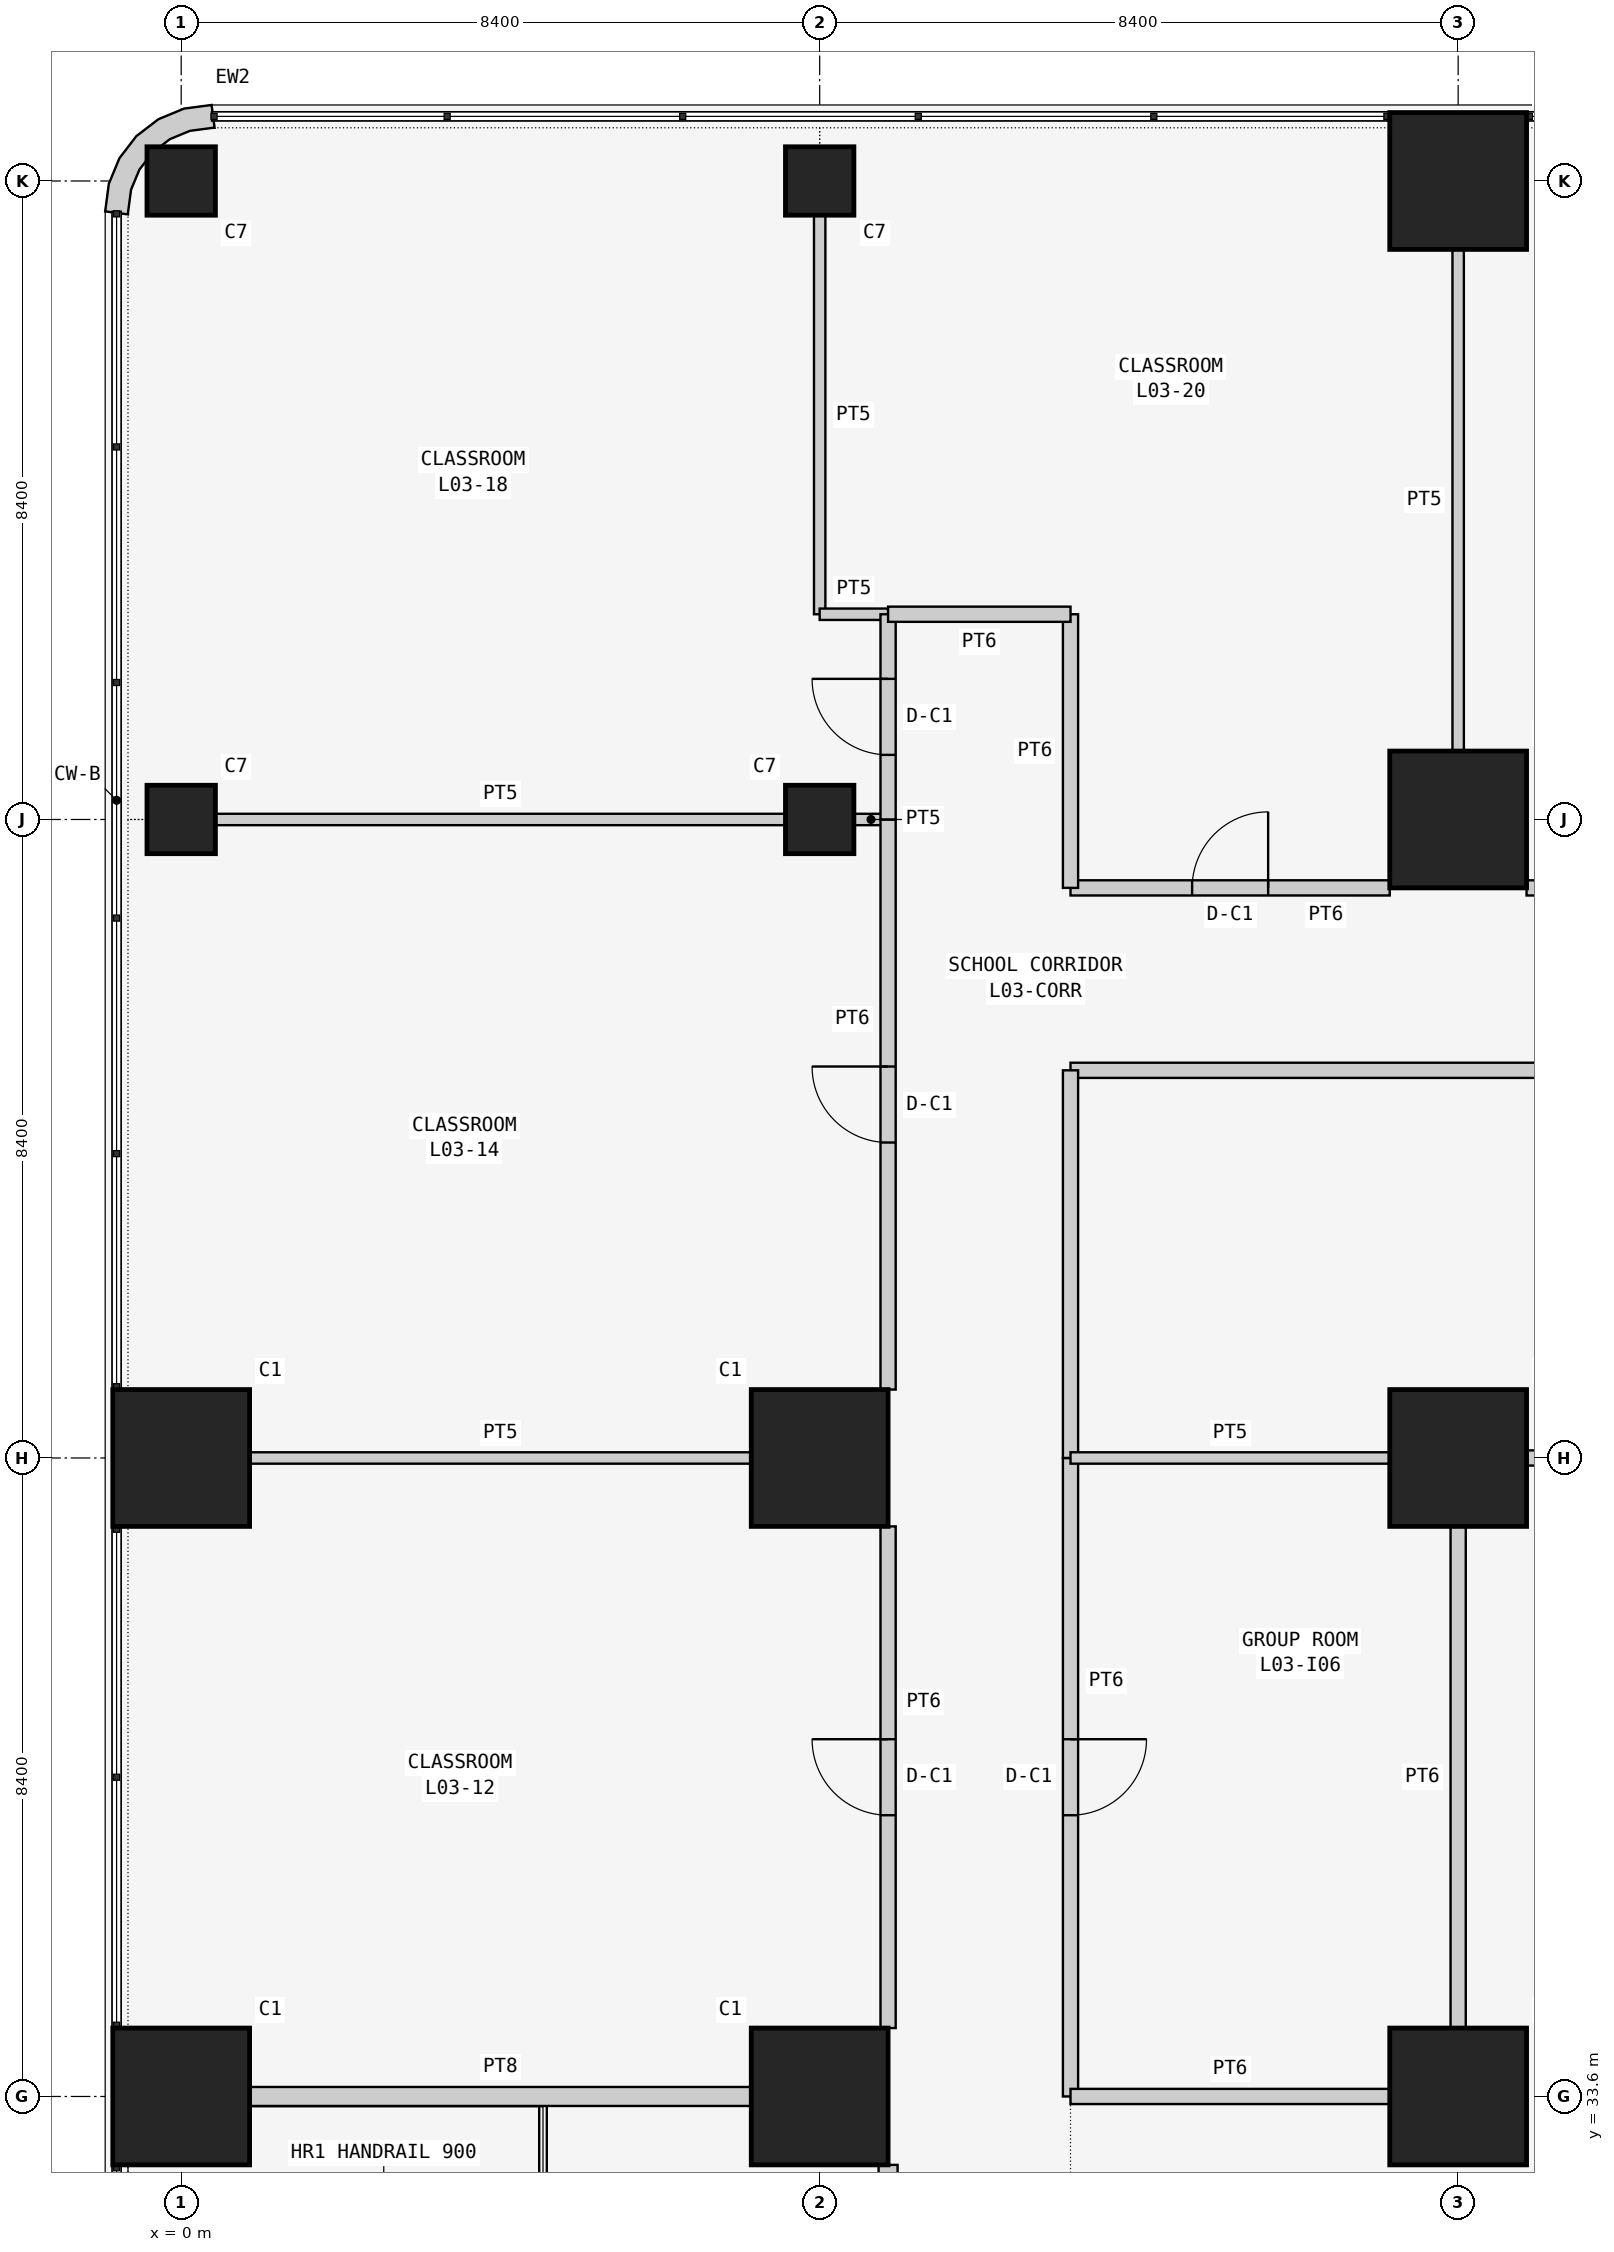
"""IFC4 building model, lengths in metres.
Left out: names, types, materials, properties, quantities, classifications, styles, units other than length and angle.
Written with IfcOpenShell. Run it as: python <this file> out.ifc"""

import sys

from ifc_helpers import new_model, si_unit, direction, frame, frame_2d, origin, origin_2d, place, context, subcontext, project, spatial, polyline, rectangle, outline, extrude, element, fill, save


model = new_model("IFC4")
c1 = context("Model", 3, precision=1e-05, world=origin(), true_north=direction((0.0, 1.0)))
c2 = subcontext(c1, "Body", "Model", "MODEL_VIEW")
j1 = project(units=[si_unit("LENGTHUNIT", "METRE"), si_unit("PLANEANGLEUNIT", "RADIAN")], contexts=[c1])
p1 = place(None, origin())
s1 = spatial("IfcSite", under=j1, at=p1, CompositionType="ELEMENT")
p2 = place(p1, origin())
s2 = spatial("IfcBuilding", under=s1, at=p2, CompositionType="ELEMENT")
p3 = place(p2, frame((0.0, 0.0, 15.0)))
s3 = spatial("IfcBuildingStorey", under=s2, at=p3, CompositionType="ELEMENT", Elevation=15.0)
for number, where, z_axis, x_axis in (
    (1, (0.0, 33.6, 0.0), (0.0, 0.0, 1.0), (1.0, 0.0, 0.0)),
    (2, (0.0, 42.0, 0.0), (0.0, 0.0, 1.0), (1.0, 0.0, 0.0)),
):
    element("IfcColumn", number, at=place(p3, frame(where, z_axis=z_axis, x_axis=x_axis)), inside=s3, PredefinedType="COLUMN", context=c2, shape_type="SweptSolid", body=[
        extrude(rectangle(XDim=1.8, YDim=1.8, at=origin_2d()), origin(), (0.0, 0.0, 1.0), 4.5),
    ])
for number, where, z_axis, x_axis in (
    (3, (0.0, 50.4, 0.0), (0.0, 0.0, 1.0), (1.0, 0.0, 0.0)),
    (4, (0.0, 58.8, 0.0), (0.0, 0.0, 1.0), (1.0, 0.0, 0.0)),
):
    element("IfcColumn", number, at=place(p3, frame(where, z_axis=z_axis, x_axis=x_axis)), inside=s3, PredefinedType="COLUMN", context=c2, shape_type="SweptSolid", body=[
        extrude(rectangle(XDim=0.9, YDim=0.9, at=origin_2d()), origin(), (0.0, 0.0, 1.0), 4.5),
    ])
for number, where, z_axis, x_axis in (
    (5, (8.4, 33.6, 0.0), (0.0, 0.0, 1.0), (1.0, 0.0, 0.0)),
    (6, (8.4, 42.0, 0.0), (0.0, 0.0, 1.0), (1.0, 0.0, 0.0)),
):
    element("IfcColumn", number, at=place(p3, frame(where, z_axis=z_axis, x_axis=x_axis)), inside=s3, PredefinedType="COLUMN", context=c2, shape_type="SweptSolid", body=[
        extrude(rectangle(XDim=1.8, YDim=1.8, at=origin_2d()), origin(), (0.0, 0.0, 1.0), 4.5),
    ])
for number, where, z_axis, x_axis in (
    (7, (8.4, 50.4, 0.0), (0.0, 0.0, 1.0), (1.0, 0.0, 0.0)),
    (8, (8.4, 58.8, 0.0), (0.0, 0.0, 1.0), (1.0, 0.0, 0.0)),
):
    element("IfcColumn", number, at=place(p3, frame(where, z_axis=z_axis, x_axis=x_axis)), inside=s3, PredefinedType="COLUMN", context=c2, shape_type="SweptSolid", body=[
        extrude(rectangle(XDim=0.9, YDim=0.9, at=origin_2d()), origin(), (0.0, 0.0, 1.0), 4.5),
    ])
for number, where, z_axis, x_axis in (
    (9, (16.8, 33.6, 0.0), (0.0, 0.0, 1.0), (1.0, 0.0, 0.0)),
    (10, (16.8, 42.0, 0.0), (0.0, 0.0, 1.0), (1.0, 0.0, 0.0)),
    (11, (16.8, 50.4, 0.0), (0.0, 0.0, 1.0), (1.0, 0.0, 0.0)),
    (12, (16.8, 58.8, 0.0), (0.0, 0.0, 1.0), (1.0, 0.0, 0.0)),
):
    element("IfcColumn", number, at=place(p3, frame(where, z_axis=z_axis, x_axis=x_axis)), inside=s3, PredefinedType="COLUMN", context=c2, shape_type="SweptSolid", body=[
        extrude(rectangle(XDim=1.8, YDim=1.8, at=origin_2d()), origin(), (0.0, 0.0, 1.0), 4.5),
    ])
p4 = place(p3, frame((0.445, 59.648, 0.0), z_axis=(0.0, 0.0, 1.0), x_axis=(-0.707106781187, 0.707106781187, 0.0)))
e13 = element("IfcWall", 13, at=p4, inside=s3, PredefinedType="SOLIDWALL", context=c2, shape_type="SweptSolid", body=[
    extrude(outline(polyline([(0.139, 1.904), (-0.101, 1.72), (-0.087, 1.706), (0.1, 1.463), (0.209, 1.198), (0.247, 0.914), (0.209, 0.63), (0.1, 0.365), (-0.087, 0.122), (-0.101, 0.108), (0.139, -0.076), (0.362, 0.214), (0.502, 0.552), (0.549, 0.914), (0.502, 1.276), (0.362, 1.614), (0.139, 1.904)])), origin(), (0.0, 0.0, 1.0), 4.3),
])
p5 = place(p3, frame((0.9, 33.6, 0.0), z_axis=(0.0, 0.0, 1.0), x_axis=(1.0, 0.0, 0.0)))
e14 = element("IfcWall", 14, at=p5, inside=s3, PredefinedType="SOLIDWALL", context=c2, shape_type="SweptSolid", body=[
    extrude(rectangle(XDim=6.6, YDim=0.25, at=frame_2d((3.3, 0.0))), origin(), (0.0, 0.0, 1.0), 3.543),
])
p6 = place(p3, frame((9.3, 32.7, 0.0), z_axis=(0.0, 0.0, 1.0), x_axis=(0.0, -1.0, 0.0)))
e15 = element("IfcWall", 15, at=p6, inside=s3, PredefinedType="SOLIDWALL", context=c2, shape_type="SweptSolid", body=[
    extrude(rectangle(XDim=6.6, YDim=0.25, at=frame_2d((3.3, 0.0))), origin(), (0.0, 0.0, 1.0), 4.3),
])
p7 = place(p6, frame((2.0, 0.0, 0.0)))
e16 = element("IfcOpeningElement", 16, at=p7, cuts=e15, PredefinedType="OPENING", context=c2, shape_type="SweptSolid", body=[
    extrude(rectangle(XDim=2.6, YDim=2.4, at=frame_2d((1.3, 1.2))), frame((0.0, 0.135, 0.0), z_axis=(0.0, -1.0, 0.0), x_axis=(1.0, 0.0, 0.0)), (0.0, 0.0, 1.0), 0.27),
])
p8 = place(p3, frame((0.9, 42.0, 0.0), z_axis=(0.0, 0.0, 1.0), x_axis=(1.0, 0.0, 0.0)))
e17 = element("IfcWall", 17, at=p8, inside=s3, PredefinedType="PARTITIONING", context=c2, shape_type="SweptSolid", body=[
    extrude(rectangle(XDim=6.6, YDim=0.15, at=frame_2d((3.3, 0.0))), origin(), (0.0, 0.0, 1.0), 3.543),
])
p9 = place(p3, frame((9.3, 41.1, 0.0), z_axis=(0.0, 0.0, 1.0), x_axis=(0.0, -1.0, 0.0)))
e18 = element("IfcWall", 18, at=p9, inside=s3, PredefinedType="PARTITIONING", context=c2, shape_type="SweptSolid", body=[
    extrude(rectangle(XDim=6.6, YDim=0.2, at=frame_2d((3.3, 0.0))), origin(), (0.0, 0.0, 1.0), 4.3),
])
p10 = place(p9, frame((2.8, 0.0, 0.0)))
e19 = element("IfcOpeningElement", 19, at=p10, cuts=e18, PredefinedType="OPENING", context=c2, shape_type="SweptSolid", body=[
    extrude(rectangle(XDim=1.0, YDim=2.1, at=frame_2d((0.5, 1.05))), frame((0.0, 0.11, 0.0), z_axis=(0.0, -1.0, 0.0), x_axis=(1.0, 0.0, 0.0)), (0.0, 0.0, 1.0), 0.22),
])
p11 = place(p3, frame((0.45, 50.4, 0.0), z_axis=(0.0, 0.0, 1.0), x_axis=(1.0, 0.0, 0.0)))
e20 = element("IfcWall", 20, at=p11, inside=s3, PredefinedType="PARTITIONING", context=c2, shape_type="SweptSolid", body=[
    extrude(rectangle(XDim=7.5, YDim=0.15, at=frame_2d((3.75, 0.0))), origin(), (0.0, 0.0, 1.0), 3.543),
])
p12 = place(p3, frame((8.85, 50.4, 0.0), z_axis=(0.0, 0.0, 1.0), x_axis=(1.0, 0.0, 0.0)))
e21 = element("IfcWall", 21, at=p12, inside=s3, PredefinedType="PARTITIONING", context=c2, shape_type="SweptSolid", body=[
    extrude(rectangle(XDim=0.45, YDim=0.15, at=frame_2d((0.225, 0.0))), origin(), (0.0, 0.0, 1.0), 3.543),
])
p13 = place(p3, frame((9.3, 50.4, 0.0), z_axis=(0.0, 0.0, 1.0), x_axis=(0.0, -1.0, 0.0)))
e22 = element("IfcWall", 22, at=p13, inside=s3, PredefinedType="PARTITIONING", context=c2, shape_type="SweptSolid", body=[
    extrude(rectangle(XDim=7.5, YDim=0.2, at=frame_2d((3.75, 0.0))), origin(), (0.0, 0.0, 1.0), 4.3),
])
p14 = place(p13, frame((3.25, 0.0, 0.0)))
e23 = element("IfcOpeningElement", 23, at=p14, cuts=e22, PredefinedType="OPENING", context=c2, shape_type="SweptSolid", body=[
    extrude(rectangle(XDim=1.0, YDim=2.1, at=frame_2d((0.5, 1.05))), frame((0.0, 0.11, 0.0), z_axis=(0.0, -1.0, 0.0), x_axis=(1.0, 0.0, 0.0)), (0.0, 0.0, 1.0), 0.22),
])
p15 = place(p3, frame((16.8, 51.3, 0.0), z_axis=(0.0, 0.0, 1.0), x_axis=(0.0, 1.0, 0.0)))
e24 = element("IfcWall", 24, at=p15, inside=s3, PredefinedType="PARTITIONING", context=c2, shape_type="SweptSolid", body=[
    extrude(rectangle(XDim=6.6, YDim=0.15, at=frame_2d((3.3, 0.0))), origin(), (0.0, 0.0, 1.0), 3.543),
])
p16 = place(p3, frame((24.3, 49.5, 0.0), z_axis=(0.0, 0.0, 1.0), x_axis=(-1.0, 0.0, 0.0)))
e25 = element("IfcWall", 25, at=p16, inside=s3, PredefinedType="PARTITIONING", context=c2, shape_type="SweptSolid", body=[
    extrude(rectangle(XDim=6.6, YDim=0.2, at=frame_2d((3.3, 0.0))), origin(), (0.0, 0.0, 1.0), 4.3),
])
p17 = place(p16, frame((2.8, 0.0, 0.0)))
e26 = element("IfcOpeningElement", 26, at=p17, cuts=e25, PredefinedType="OPENING", context=c2, shape_type="SweptSolid", body=[
    extrude(rectangle(XDim=1.0, YDim=2.1, at=frame_2d((0.5, 1.05))), frame((0.0, 0.11, 0.0), z_axis=(0.0, -1.0, 0.0), x_axis=(1.0, 0.0, 0.0)), (0.0, 0.0, 1.0), 0.22),
])
p18 = place(p3, frame((8.4, 58.35, 0.0), z_axis=(0.0, 0.0, 1.0), x_axis=(0.0, -1.0, 0.0)))
e27 = element("IfcWall", 27, at=p18, inside=s3, PredefinedType="PARTITIONING", context=c2, shape_type="SweptSolid", body=[
    extrude(rectangle(XDim=5.25, YDim=0.15, at=frame_2d((2.625, 0.0))), origin(), (0.0, 0.0, 1.0), 3.543),
])
p19 = place(p3, frame((8.4, 53.1, 0.0), z_axis=(0.0, 0.0, 1.0), x_axis=(1.0, 0.0, 0.0)))
e28 = element("IfcWall", 28, at=p19, inside=s3, PredefinedType="PARTITIONING", context=c2, shape_type="SweptSolid", body=[
    extrude(rectangle(XDim=0.9, YDim=0.15, at=frame_2d((0.45, 0.0))), origin(), (0.0, 0.0, 1.0), 4.3),
])
p20 = place(p3, frame((9.3, 53.1, 0.0), z_axis=(0.0, 0.0, 1.0), x_axis=(0.0, -1.0, 0.0)))
e29 = element("IfcWall", 29, at=p20, inside=s3, PredefinedType="PARTITIONING", context=c2, shape_type="SweptSolid", body=[
    extrude(rectangle(XDim=2.7, YDim=0.2, at=frame_2d((1.35, 0.0))), origin(), (0.0, 0.0, 1.0), 4.3),
])
p21 = place(p20, frame((0.85, 0.0, 0.0)))
e30 = element("IfcOpeningElement", 30, at=p21, cuts=e29, PredefinedType="OPENING", context=c2, shape_type="SweptSolid", body=[
    extrude(rectangle(XDim=1.0, YDim=2.1, at=frame_2d((0.5, 1.05))), frame((0.0, 0.11, 0.0), z_axis=(0.0, -1.0, 0.0), x_axis=(1.0, 0.0, 0.0)), (0.0, 0.0, 1.0), 0.22),
])
p22 = place(p3, frame((15.9, 49.5, 0.0), z_axis=(0.0, 0.0, 1.0), x_axis=(-1.0, 0.0, 0.0)))
e31 = element("IfcWall", 31, at=p22, inside=s3, PredefinedType="PARTITIONING", context=c2, shape_type="SweptSolid", body=[
    extrude(rectangle(XDim=4.2, YDim=0.2, at=frame_2d((2.1, 0.0))), origin(), (0.0, 0.0, 1.0), 4.3),
])
p23 = place(p22, frame((1.6, 0.0, 0.0)))
e32 = element("IfcOpeningElement", 32, at=p23, cuts=e31, PredefinedType="OPENING", context=c2, shape_type="SweptSolid", body=[
    extrude(rectangle(XDim=1.0, YDim=2.1, at=frame_2d((0.5, 1.05))), frame((0.0, 0.11, 0.0), z_axis=(0.0, -1.0, 0.0), x_axis=(1.0, 0.0, 0.0)), (0.0, 0.0, 1.0), 0.22),
])
p24 = place(p3, frame((11.7, 49.5, 0.0), z_axis=(0.0, 0.0, 1.0), x_axis=(0.0, 1.0, 0.0)))
e33 = element("IfcWall", 33, at=p24, inside=s3, PredefinedType="PARTITIONING", context=c2, shape_type="SweptSolid", body=[
    extrude(rectangle(XDim=3.6, YDim=0.2, at=frame_2d((1.8, 0.0))), origin(), (0.0, 0.0, 1.0), 4.3),
])
p25 = place(p3, frame((11.7, 53.1, 0.0), z_axis=(0.0, 0.0, 1.0), x_axis=(-1.0, 0.0, 0.0)))
e34 = element("IfcWall", 34, at=p25, inside=s3, PredefinedType="PARTITIONING", context=c2, shape_type="SweptSolid", body=[
    extrude(rectangle(XDim=2.4, YDim=0.2, at=frame_2d((1.2, 0.0))), origin(), (0.0, 0.0, 1.0), 4.3),
])
p26 = place(p3, frame((11.7, 42.0, 0.0), z_axis=(0.0, 0.0, 1.0), x_axis=(0.0, -1.0, 0.0)))
e35 = element("IfcWall", 35, at=p26, inside=s3, PredefinedType="PARTITIONING", context=c2, shape_type="SweptSolid", body=[
    extrude(rectangle(XDim=8.4, YDim=0.2, at=frame_2d((4.2, 0.0))), origin(), (0.0, 0.0, 1.0), 4.3),
])
p27 = place(p26, frame((3.7, 0.0, 0.0)))
e36 = element("IfcOpeningElement", 36, at=p27, cuts=e35, PredefinedType="OPENING", context=c2, shape_type="SweptSolid", body=[
    extrude(rectangle(XDim=1.0, YDim=2.1, at=frame_2d((0.5, 1.05))), frame((0.0, 0.11, 0.0), z_axis=(0.0, -1.0, 0.0), x_axis=(1.0, 0.0, 0.0)), (0.0, 0.0, 1.0), 0.22),
])
p28 = place(p3, frame((25.2, 47.1, 0.0), z_axis=(0.0, 0.0, 1.0), x_axis=(-1.0, 0.0, 0.0)))
e37 = element("IfcWall", 37, at=p28, inside=s3, PredefinedType="PARTITIONING", context=c2, shape_type="SweptSolid", body=[
    extrude(rectangle(XDim=13.5, YDim=0.2, at=frame_2d((6.75, 0.0))), origin(), (0.0, 0.0, 1.0), 4.3),
])
p29 = place(p28, frame((6.25, 0.0, 0.0)))
e38 = element("IfcOpeningElement", 38, at=p29, cuts=e37, PredefinedType="OPENING", context=c2, shape_type="SweptSolid", body=[
    extrude(rectangle(XDim=1.0, YDim=2.1, at=frame_2d((0.5, 1.05))), frame((0.0, 0.11, 0.0), z_axis=(0.0, -1.0, 0.0), x_axis=(1.0, 0.0, 0.0)), (0.0, 0.0, 1.0), 0.22),
])
p30 = place(p3, frame((11.7, 47.1, 0.0), z_axis=(0.0, 0.0, 1.0), x_axis=(0.0, -1.0, 0.0)))
e39 = element("IfcWall", 39, at=p30, inside=s3, PredefinedType="PARTITIONING", context=c2, shape_type="SweptSolid", body=[
    extrude(rectangle(XDim=5.1, YDim=0.2, at=frame_2d((2.55, 0.0))), origin(), (0.0, 0.0, 1.0), 4.3),
])
p31 = place(p3, frame((11.7, 33.6, 0.0), z_axis=(0.0, 0.0, 1.0), x_axis=(1.0, 0.0, 0.0)))
e40 = element("IfcWall", 40, at=p31, inside=s3, PredefinedType="PARTITIONING", context=c2, shape_type="SweptSolid", body=[
    extrude(rectangle(XDim=4.2, YDim=0.2, at=frame_2d((2.1, 0.0))), origin(), (0.0, 0.0, 1.0), 3.543),
])
p32 = place(p3, frame((16.8, 34.5, 0.0), z_axis=(0.0, 0.0, 1.0), x_axis=(0.0, 1.0, 0.0)))
e41 = element("IfcWall", 41, at=p32, inside=s3, PredefinedType="PARTITIONING", context=c2, shape_type="SweptSolid", body=[
    extrude(rectangle(XDim=6.6, YDim=0.2, at=frame_2d((3.3, 0.0))), origin(), (0.0, 0.0, 1.0), 3.543),
])
p33 = place(p3, frame((17.7, 42.0, 0.0), z_axis=(0.0, 0.0, 1.0), x_axis=(1.0, 0.0, 0.0)))
e42 = element("IfcWall", 42, at=p33, inside=s3, PredefinedType="PARTITIONING", context=c2, shape_type="SweptSolid", body=[
    extrude(rectangle(XDim=2.8, YDim=0.2, at=frame_2d((1.4, 0.0))), origin(), (0.0, 0.0, 1.0), 3.543),
])
p34 = place(p3, frame((11.7, 42.0, 0.0), z_axis=(0.0, 0.0, 1.0), x_axis=(1.0, 0.0, 0.0)))
e43 = element("IfcWall", 43, at=p34, inside=s3, PredefinedType="PARTITIONING", context=c2, shape_type="SweptSolid", body=[
    extrude(rectangle(XDim=4.2, YDim=0.15, at=frame_2d((2.1, 0.0))), origin(), (0.0, 0.0, 1.0), 3.543),
])
p35 = place(p10, frame((1.0, 0.0, 0.0), z_axis=(0.0, 0.0, 1.0), x_axis=(-1.0, 0.0, 0.0)))
e44 = element("IfcDoor", 44, at=p35, inside=s3, OperationType="SINGLE_SWING_RIGHT", PredefinedType="DOOR", context=c2, shape_type="SweptSolid", body=[
    extrude(rectangle(XDim=1.0, YDim=2.1, at=frame_2d((0.5, 1.05))), frame((0.0, 0.025, 0.0), z_axis=(0.0, -1.0, 0.0), x_axis=(1.0, 0.0, 0.0)), (0.0, 0.0, 1.0), 0.05),
])
fill(e19, e44)
p36 = place(p14, frame((1.0, 0.0, 0.0), z_axis=(0.0, 0.0, 1.0), x_axis=(-1.0, 0.0, 0.0)))
e45 = element("IfcDoor", 45, at=p36, inside=s3, OperationType="SINGLE_SWING_RIGHT", PredefinedType="DOOR", context=c2, shape_type="SweptSolid", body=[
    extrude(rectangle(XDim=1.0, YDim=2.1, at=frame_2d((0.5, 1.05))), frame((0.0, 0.025, 0.0), z_axis=(0.0, -1.0, 0.0), x_axis=(1.0, 0.0, 0.0)), (0.0, 0.0, 1.0), 0.05),
])
fill(e23, e45)
p37 = place(p21, frame((1.0, 0.0, 0.0), z_axis=(0.0, 0.0, 1.0), x_axis=(-1.0, 0.0, 0.0)))
e46 = element("IfcDoor", 46, at=p37, inside=s3, OperationType="SINGLE_SWING_RIGHT", PredefinedType="DOOR", context=c2, shape_type="SweptSolid", body=[
    extrude(rectangle(XDim=1.0, YDim=2.1, at=frame_2d((0.5, 1.05))), frame((0.0, 0.025, 0.0), z_axis=(0.0, -1.0, 0.0), x_axis=(1.0, 0.0, 0.0)), (0.0, 0.0, 1.0), 0.05),
])
fill(e30, e46)
p38 = place(p23, frame((1.0, 0.0, 0.0), z_axis=(0.0, 0.0, 1.0), x_axis=(-1.0, 0.0, 0.0)))
e47 = element("IfcDoor", 47, at=p38, inside=s3, OperationType="SINGLE_SWING_RIGHT", PredefinedType="DOOR", context=c2, shape_type="SweptSolid", body=[
    extrude(rectangle(XDim=1.0, YDim=2.1, at=frame_2d((0.5, 1.05))), frame((0.0, 0.025, 0.0), z_axis=(0.0, -1.0, 0.0), x_axis=(1.0, 0.0, 0.0)), (0.0, 0.0, 1.0), 0.05),
])
fill(e32, e47)
p39 = place(p27, origin())
e48 = element("IfcDoor", 48, at=p39, inside=s3, OperationType="SINGLE_SWING_LEFT", PredefinedType="DOOR", context=c2, shape_type="SweptSolid", body=[
    extrude(rectangle(XDim=1.0, YDim=2.1, at=frame_2d((0.5, 1.05))), frame((0.0, 0.025, 0.0), z_axis=(0.0, -1.0, 0.0), x_axis=(1.0, 0.0, 0.0)), (0.0, 0.0, 1.0), 0.05),
])
fill(e36, e48)
save(model, sys.argv[1])
